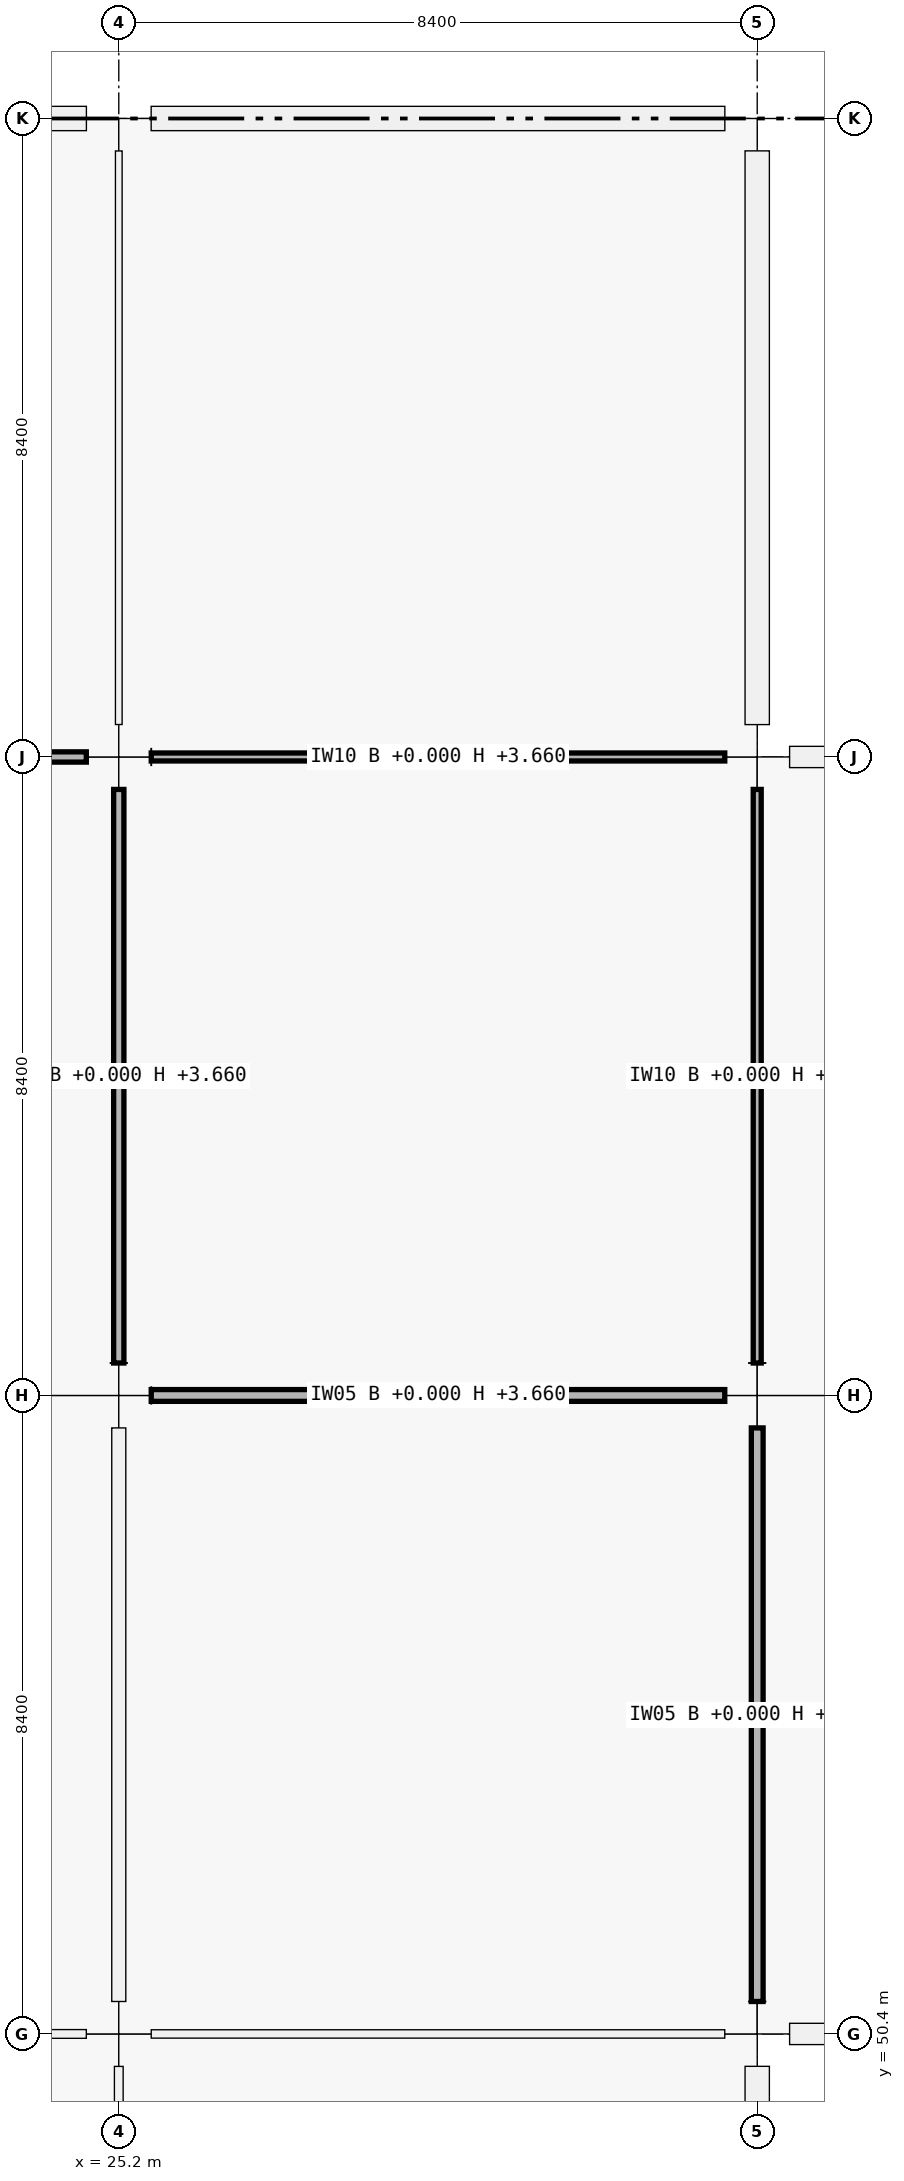
"""IFC4 building model, lengths in metres.
Left out: names, types, materials, properties, quantities, classifications, styles, units other than length and angle.
Written with IfcOpenShell. Run it as: python <this file> out.ifc"""

import sys

from ifc_helpers import new_model, si_unit, direction, frame, frame_2d, origin, origin_2d, place, context, subcontext, project, spatial, rectangle, extrude, element, fill, save


model = new_model("IFC4")
c1 = context("Model", 3, precision=1e-05, world=origin(), true_north=direction((0.0, 1.0)))
c2 = subcontext(c1, "Body", "Model", "MODEL_VIEW")
j1 = project(units=[si_unit("LENGTHUNIT", "METRE"), si_unit("PLANEANGLEUNIT", "RADIAN")], contexts=[c1])
p1 = place(None, origin())
s1 = spatial("IfcSite", under=j1, at=p1, CompositionType="ELEMENT")
p2 = place(p1, origin())
s2 = spatial("IfcBuilding", under=s1, at=p2, CompositionType="ELEMENT")
p3 = place(p2, origin())
s3 = spatial("IfcBuildingStorey", under=s2, at=p3, CompositionType="ELEMENT", Elevation=0.0)
for number, where, z_axis, x_axis in (
    (1, (25.2, 50.4, 0.0), (0.0, 0.0, 1.0), (1.0, 0.0, 0.0)),
    (2, (25.2, 58.8, 0.0), (0.0, 0.0, 1.0), (1.0, 0.0, 0.0)),
    (3, (25.2, 67.2, 0.0), (0.0, 0.0, 1.0), (1.0, 0.0, 0.0)),
    (4, (25.2, 75.6, 0.0), (0.0, 0.0, 1.0), (1.0, 0.0, 0.0)),
    (5, (33.6, 50.4, 0.0), (0.0, 0.0, 1.0), (1.0, 0.0, 0.0)),
    (6, (33.6, 58.8, 0.0), (0.0, 0.0, 1.0), (1.0, 0.0, 0.0)),
    (7, (33.6, 67.2, 0.0), (0.0, 0.0, 1.0), (1.0, 0.0, 0.0)),
    (8, (33.6, 75.6, 0.0), (0.0, 0.0, 1.0), (1.0, 0.0, 0.0)),
):
    element("IfcColumn", number, at=place(p3, frame(where, z_axis=z_axis, x_axis=x_axis)), inside=s3, PredefinedType="COLUMN", context=c2, shape_type="SweptSolid", body=[
        extrude(rectangle(XDim=0.85, YDim=0.85, at=origin_2d()), origin(), (0.0, 0.0, 1.0), 5.76),
    ])
p4 = place(p3, frame((17.226, 75.6, 0.0), z_axis=(0.0, 0.0, 1.0), x_axis=(1.0, 0.0, 0.0)))
e9 = element("IfcWall", 9, at=p4, inside=s3, PredefinedType="SOLIDWALL", context=c2, shape_type="SweptSolid", body=[
    extrude(rectangle(XDim=7.548, YDim=0.32, at=frame_2d((3.774, 0.0))), origin(), (0.0, 0.0, 1.0), 4.7),
])
p5 = place(p4, frame((2.474, 0.0, 0.9)))
e10 = element("IfcOpeningElement", 10, at=p5, cuts=e9, PredefinedType="OPENING", context=c2, shape_type="SweptSolid", body=[
    extrude(rectangle(XDim=2.6, YDim=2.1, at=frame_2d((1.3, 1.05))), frame((0.0, 0.16, 0.0), z_axis=(0.0, -1.0, 0.0), x_axis=(1.0, 0.0, 0.0)), (0.0, 0.0, 1.0), 0.32),
])
p6 = place(p3, frame((33.6, 49.974, 0.0), z_axis=(0.0, 0.0, 1.0), x_axis=(0.0, -1.0, 0.0)))
e11 = element("IfcWall", 11, at=p6, inside=s3, PredefinedType="SOLIDWALL", context=c2, shape_type="SweptSolid", body=[
    extrude(rectangle(XDim=7.548, YDim=0.32, at=frame_2d((3.774, 0.0))), origin(), (0.0, 0.0, 1.0), 4.7),
])
p7 = place(p6, frame((2.674, 0.0, 0.9)))
e12 = element("IfcOpeningElement", 12, at=p7, cuts=e11, PredefinedType="OPENING", context=c2, shape_type="SweptSolid", body=[
    extrude(rectangle(XDim=2.2, YDim=1.75, at=frame_2d((1.1, 0.875))), frame((0.0, 0.16, 0.0), z_axis=(0.0, -1.0, 0.0), x_axis=(1.0, 0.0, 0.0)), (0.0, 0.0, 1.0), 0.32),
])
p8 = place(p3, frame((25.626, 75.6, 0.0), z_axis=(0.0, 0.0, 1.0), x_axis=(1.0, 0.0, 0.0)))
e13 = element("IfcWall", 13, at=p8, inside=s3, PredefinedType="SOLIDWALL", context=c2, shape_type="SweptSolid", body=[
    extrude(rectangle(XDim=7.548, YDim=0.32, at=frame_2d((3.774, 0.0))), origin(), (0.0, 0.0, 1.0), 4.7),
])
p9 = place(p8, frame((2.374, 0.0, 0.9)))
e14 = element("IfcOpeningElement", 14, at=p9, cuts=e13, PredefinedType="OPENING", context=c2, shape_type="SweptSolid", body=[
    extrude(rectangle(XDim=2.8, YDim=1.75, at=frame_2d((1.4, 0.875))), frame((0.0, 0.16, 0.0), z_axis=(0.0, -1.0, 0.0), x_axis=(1.0, 0.0, 0.0)), (0.0, 0.0, 1.0), 0.32),
])
p10 = place(p3, frame((33.6, 75.174, 0.0), z_axis=(0.0, 0.0, 1.0), x_axis=(0.0, -1.0, 0.0)))
e15 = element("IfcWall", 15, at=p10, inside=s3, PredefinedType="SOLIDWALL", context=c2, shape_type="SweptSolid", body=[
    extrude(rectangle(XDim=7.548, YDim=0.32, at=frame_2d((3.774, 0.0))), origin(), (0.0, 0.0, 1.0), 4.7),
])
p11 = place(p10, frame((2.824, 0.0, 0.9)))
e16 = element("IfcOpeningElement", 16, at=p11, cuts=e15, PredefinedType="OPENING", context=c2, shape_type="SweptSolid", body=[
    extrude(rectangle(XDim=1.9, YDim=1.75, at=frame_2d((0.95, 0.875))), frame((0.0, 0.16, 0.0), z_axis=(0.0, -1.0, 0.0), x_axis=(1.0, 0.0, 0.0)), (0.0, 0.0, 1.0), 0.32),
])
p12 = place(p3, frame((41.599, 50.4, 0.0), z_axis=(0.0, 0.0, 1.0), x_axis=(-1.0, 0.0, 0.0)))
e17 = element("IfcWall", 17, at=p12, inside=s3, PredefinedType="SOLIDWALL", context=c2, shape_type="SweptSolid", body=[
    extrude(rectangle(XDim=7.573, YDim=0.28, at=frame_2d((3.787, 0.0))), origin(), (0.0, 0.0, 1.0), 4.7),
])
p13 = place(p3, frame((34.026, 67.2, 0.0), z_axis=(0.0, 0.0, 1.0), x_axis=(1.0, 0.0, 0.0)))
e18 = element("IfcWall", 18, at=p13, inside=s3, PredefinedType="SOLIDWALL", context=c2, shape_type="SweptSolid", body=[
    extrude(rectangle(XDim=7.548, YDim=0.28, at=frame_2d((3.774, 0.0))), origin(), (0.0, 0.0, 1.0), 4.7),
])
p14 = place(p13, frame((3.074, 0.0, 0.9)))
e19 = element("IfcOpeningElement", 19, at=p14, cuts=e18, PredefinedType="OPENING", context=c2, shape_type="SweptSolid", body=[
    extrude(rectangle(XDim=1.4, YDim=1.75, at=frame_2d((0.7, 0.875))), frame((0.0, 0.14, 0.0), z_axis=(0.0, -1.0, 0.0), x_axis=(1.0, 0.0, 0.0)), (0.0, 0.0, 1.0), 0.28),
])
p15 = place(p3, frame((17.227, 50.4, 0.0), z_axis=(0.0, 0.0, 1.0), x_axis=(1.0, 0.0, 0.0)))
e20 = element("IfcWall", 20, at=p15, inside=s3, PredefinedType="PARTITIONING", context=c2, shape_type="SweptSolid", body=[
    extrude(rectangle(XDim=7.546, YDim=0.115, at=frame_2d((3.773, 0.0))), origin(), (0.0, 0.0, 1.0), 3.66),
])
p16 = place(p15, frame((0.578, 0.0, 0.0)))
e21 = element("IfcOpeningElement", 21, at=p16, cuts=e20, PredefinedType="OPENING", context=c2, shape_type="SweptSolid", body=[
    extrude(rectangle(XDim=0.92, YDim=2.1, at=frame_2d((0.46, 1.05))), frame((0.0, 0.058, 0.0), z_axis=(0.0, -1.0, 0.0), x_axis=(1.0, 0.0, 0.0)), (0.0, 0.0, 1.0), 0.115),
])
p17 = place(p15, frame((4.468, 0.0, 0.0)))
e22 = element("IfcOpeningElement", 22, at=p17, cuts=e20, PredefinedType="OPENING", context=c2, shape_type="SweptSolid", body=[
    extrude(rectangle(XDim=0.98, YDim=2.08, at=frame_2d((0.49, 1.04))), frame((0.0, 0.058, 0.0), z_axis=(0.0, -1.0, 0.0), x_axis=(1.0, 0.0, 0.0)), (0.0, 0.0, 1.0), 0.115),
])
p18 = place(p3, frame((17.227, 67.2, 0.0), z_axis=(0.0, 0.0, 1.0), x_axis=(1.0, 0.0, 0.0)))
e23 = element("IfcWall", 23, at=p18, inside=s3, PredefinedType="PARTITIONING", context=c2, shape_type="SweptSolid", body=[
    extrude(rectangle(XDim=7.546, YDim=0.135, at=frame_2d((3.773, 0.0))), origin(), (0.0, 0.0, 1.0), 3.66),
])
p19 = place(p18, frame((3.283, 0.0, 0.0)))
e24 = element("IfcOpeningElement", 24, at=p19, cuts=e23, PredefinedType="OPENING", context=c2, shape_type="SweptSolid", body=[
    extrude(rectangle(XDim=0.98, YDim=2.18, at=frame_2d((0.49, 1.09))), frame((0.0, 0.067, 0.0), z_axis=(0.0, -1.0, 0.0), x_axis=(1.0, 0.0, 0.0)), (0.0, 0.0, 1.0), 0.135),
])
p20 = place(p3, frame((25.627, 50.4, 0.0), z_axis=(0.0, 0.0, 1.0), x_axis=(1.0, 0.0, 0.0)))
e25 = element("IfcWall", 25, at=p20, inside=s3, PredefinedType="MOVABLE", context=c2, shape_type="SweptSolid", body=[
    extrude(rectangle(XDim=7.546, YDim=0.11, at=frame_2d((3.773, 0.0))), origin(), (0.0, 0.0, 1.0), 3.66),
])
p21 = place(p20, frame((3.233, 0.0, 0.0)))
e26 = element("IfcOpeningElement", 26, at=p21, cuts=e25, PredefinedType="OPENING", context=c2, shape_type="SweptSolid", body=[
    extrude(rectangle(XDim=1.08, YDim=2.25, at=frame_2d((0.54, 1.125))), frame((0.0, 0.055, 0.0), z_axis=(0.0, -1.0, 0.0), x_axis=(1.0, 0.0, 0.0)), (0.0, 0.0, 1.0), 0.11),
])
p22 = place(p3, frame((25.627, 58.8, 0.0), z_axis=(0.0, 0.0, 1.0), x_axis=(1.0, 0.0, 0.0)))
e27 = element("IfcWall", 27, at=p22, inside=s3, PredefinedType="PARTITIONING", context=c2, shape_type="SweptSolid", body=[
    extrude(rectangle(XDim=7.546, YDim=0.155, at=frame_2d((3.773, 0.0))), origin(), (0.0, 0.0, 1.0), 3.66),
])
p23 = place(p22, frame((3.243, 0.0, 0.0)))
e28 = element("IfcOpeningElement", 28, at=p23, cuts=e27, PredefinedType="OPENING", context=c2, shape_type="SweptSolid", body=[
    extrude(rectangle(XDim=1.06, YDim=2.25, at=frame_2d((0.53, 1.125))), frame((0.0, 0.078, 0.0), z_axis=(0.0, -1.0, 0.0), x_axis=(1.0, 0.0, 0.0)), (0.0, 0.0, 1.0), 0.155),
])
p24 = place(p3, frame((25.627, 67.2, 0.0), z_axis=(0.0, 0.0, 1.0), x_axis=(1.0, 0.0, 0.0)))
e29 = element("IfcWall", 29, at=p24, inside=s3, PredefinedType="PARTITIONING", context=c2, shape_type="SweptSolid", body=[
    extrude(rectangle(XDim=7.546, YDim=0.105, at=frame_2d((3.773, 0.0))), origin(), (0.0, 0.0, 1.0), 3.66),
])
p25 = place(p24, frame((3.248, 0.0, 0.0)))
e30 = element("IfcOpeningElement", 30, at=p25, cuts=e29, PredefinedType="OPENING", context=c2, shape_type="SweptSolid", body=[
    extrude(rectangle(XDim=1.05, YDim=2.12, at=frame_2d((0.525, 1.06))), frame((0.0, 0.052, 0.0), z_axis=(0.0, -1.0, 0.0), x_axis=(1.0, 0.0, 0.0)), (0.0, 0.0, 1.0), 0.105),
])
p26 = place(p3, frame((25.2, 42.427, 0.0), z_axis=(0.0, 0.0, 1.0), x_axis=(0.0, 1.0, 0.0)))
e31 = element("IfcWall", 31, at=p26, inside=s3, PredefinedType="PARTITIONING", context=c2, shape_type="SweptSolid", body=[
    extrude(rectangle(XDim=7.546, YDim=0.115, at=frame_2d((3.773, 0.0))), origin(), (0.0, 0.0, 1.0), 3.66),
])
p27 = place(p3, frame((25.2, 50.827, 0.0), z_axis=(0.0, 0.0, 1.0), x_axis=(0.0, 1.0, 0.0)))
e32 = element("IfcWall", 32, at=p27, inside=s3, PredefinedType="PARTITIONING", context=c2, shape_type="SweptSolid", body=[
    extrude(rectangle(XDim=7.546, YDim=0.185, at=frame_2d((3.773, 0.0))), origin(), (0.0, 0.0, 1.0), 3.66),
])
p28 = place(p27, frame((3.303, 0.0, 0.0)))
e33 = element("IfcOpeningElement", 33, at=p28, cuts=e32, PredefinedType="OPENING", context=c2, shape_type="SweptSolid", body=[
    extrude(rectangle(XDim=0.94, YDim=2.15, at=frame_2d((0.47, 1.075))), frame((0.0, 0.093, 0.0), z_axis=(0.0, -1.0, 0.0), x_axis=(1.0, 0.0, 0.0)), (0.0, 0.0, 1.0), 0.185),
])
p29 = place(p3, frame((25.2, 59.227, 0.0), z_axis=(0.0, 0.0, 1.0), x_axis=(0.0, 1.0, 0.0)))
e34 = element("IfcWall", 34, at=p29, inside=s3, PredefinedType="PARTITIONING", context=c2, shape_type="SweptSolid", body=[
    extrude(rectangle(XDim=7.546, YDim=0.135, at=frame_2d((3.773, 0.0))), origin(), (0.0, 0.0, 1.0), 3.66),
])
p30 = place(p29, frame((3.313, 0.0, 0.0)))
e35 = element("IfcOpeningElement", 35, at=p30, cuts=e34, PredefinedType="OPENING", context=c2, shape_type="SweptSolid", body=[
    extrude(rectangle(XDim=0.92, YDim=2.15, at=frame_2d((0.46, 1.075))), frame((0.0, 0.067, 0.0), z_axis=(0.0, -1.0, 0.0), x_axis=(1.0, 0.0, 0.0)), (0.0, 0.0, 1.0), 0.135),
])
p31 = place(p3, frame((25.2, 67.627, 0.0), z_axis=(0.0, 0.0, 1.0), x_axis=(0.0, 1.0, 0.0)))
e36 = element("IfcWall", 36, at=p31, inside=s3, PredefinedType="PARTITIONING", context=c2, shape_type="SweptSolid", body=[
    extrude(rectangle(XDim=7.546, YDim=0.088, at=frame_2d((3.773, 0.0))), origin(), (0.0, 0.0, 1.0), 3.66),
])
p32 = place(p31, frame((3.288, 0.0, 0.0)))
e37 = element("IfcOpeningElement", 37, at=p32, cuts=e36, PredefinedType="OPENING", context=c2, shape_type="SweptSolid", body=[
    extrude(rectangle(XDim=0.97, YDim=2.12, at=frame_2d((0.485, 1.06))), frame((0.0, 0.044, 0.0), z_axis=(0.0, -1.0, 0.0), x_axis=(1.0, 0.0, 0.0)), (0.0, 0.0, 1.0), 0.088),
])
p33 = place(p3, frame((33.6, 50.827, 0.0), z_axis=(0.0, 0.0, 1.0), x_axis=(0.0, 1.0, 0.0)))
e38 = element("IfcWall", 38, at=p33, inside=s3, PredefinedType="PARTITIONING", context=c2, shape_type="SweptSolid", body=[
    extrude(rectangle(XDim=7.546, YDim=0.155, at=frame_2d((3.773, 0.0))), origin(), (0.0, 0.0, 1.0), 3.66),
])
p34 = place(p33, frame((3.048, 0.0, 0.0)))
e39 = element("IfcOpeningElement", 39, at=p34, cuts=e38, PredefinedType="OPENING", context=c2, shape_type="SweptSolid", body=[
    extrude(rectangle(XDim=1.45, YDim=2.2, at=frame_2d((0.725, 1.1))), frame((0.0, 0.078, 0.0), z_axis=(0.0, -1.0, 0.0), x_axis=(1.0, 0.0, 0.0)), (0.0, 0.0, 1.0), 0.155),
])
p35 = place(p3, frame((33.6, 59.227, 0.0), z_axis=(0.0, 0.0, 1.0), x_axis=(0.0, 1.0, 0.0)))
e40 = element("IfcWall", 40, at=p35, inside=s3, PredefinedType="PARTITIONING", context=c2, shape_type="SweptSolid", body=[
    extrude(rectangle(XDim=7.546, YDim=0.105, at=frame_2d((3.773, 0.0))), origin(), (0.0, 0.0, 1.0), 3.66),
])
p36 = place(p35, frame((3.073, 0.0, 0.0)))
e41 = element("IfcOpeningElement", 41, at=p36, cuts=e40, PredefinedType="OPENING", context=c2, shape_type="SweptSolid", body=[
    extrude(rectangle(XDim=1.4, YDim=2.25, at=frame_2d((0.7, 1.125))), frame((0.0, 0.052, 0.0), z_axis=(0.0, -1.0, 0.0), x_axis=(1.0, 0.0, 0.0)), (0.0, 0.0, 1.0), 0.105),
])
p37 = place(p9, origin())
e42 = element("IfcWindow", 42, at=p37, inside=s3, PartitioningType="SINGLE_PANEL", PredefinedType="WINDOW", context=c2, shape_type="SweptSolid", body=[
    extrude(rectangle(XDim=2.8, YDim=1.75, at=frame_2d((1.4, 0.875))), frame((0.0, 0.03, 0.0), z_axis=(0.0, -1.0, 0.0), x_axis=(1.0, 0.0, 0.0)), (0.0, 0.0, 1.0), 0.06),
])
fill(e14, e42)
p38 = place(p11, origin())
e43 = element("IfcWindow", 43, at=p38, inside=s3, PartitioningType="SINGLE_PANEL", PredefinedType="WINDOW", context=c2, shape_type="SweptSolid", body=[
    extrude(rectangle(XDim=1.9, YDim=1.75, at=frame_2d((0.95, 0.875))), frame((0.0, 0.03, 0.0), z_axis=(0.0, -1.0, 0.0), x_axis=(1.0, 0.0, 0.0)), (0.0, 0.0, 1.0), 0.06),
])
fill(e16, e43)
p39 = place(p28, origin())
e44 = element("IfcDoor", 44, at=p39, inside=s3, OperationType="SINGLE_SWING_LEFT", PredefinedType="DOOR", context=c2, shape_type="SweptSolid", body=[
    extrude(rectangle(XDim=0.94, YDim=2.15, at=frame_2d((0.47, 1.075))), frame((0.0, 0.025, 0.0), z_axis=(0.0, -1.0, 0.0), x_axis=(1.0, 0.0, 0.0)), (0.0, 0.0, 1.0), 0.05),
])
fill(e33, e44)
p40 = place(p30, origin())
e45 = element("IfcDoor", 45, at=p40, inside=s3, OperationType="SINGLE_SWING_RIGHT", PredefinedType="DOOR", context=c2, shape_type="SweptSolid", body=[
    extrude(rectangle(XDim=0.92, YDim=2.15, at=frame_2d((0.46, 1.075))), frame((0.0, 0.025, 0.0), z_axis=(0.0, -1.0, 0.0), x_axis=(1.0, 0.0, 0.0)), (0.0, 0.0, 1.0), 0.05),
])
fill(e35, e45)
p41 = place(p34, origin())
e46 = element("IfcDoor", 46, at=p41, inside=s3, OperationType="DOUBLE_DOOR_SINGLE_SWING", PredefinedType="DOOR", context=c2, shape_type="SweptSolid", body=[
    extrude(rectangle(XDim=1.45, YDim=2.2, at=frame_2d((0.725, 1.1))), frame((0.0, 0.025, 0.0), z_axis=(0.0, -1.0, 0.0), x_axis=(1.0, 0.0, 0.0)), (0.0, 0.0, 1.0), 0.05),
])
fill(e39, e46)
p42 = place(p36, origin())
e47 = element("IfcDoor", 47, at=p42, inside=s3, OperationType="DOUBLE_DOOR_SINGLE_SWING", PredefinedType="DOOR", context=c2, shape_type="SweptSolid", body=[
    extrude(rectangle(XDim=1.4, YDim=2.25, at=frame_2d((0.7, 1.125))), frame((0.0, 0.025, 0.0), z_axis=(0.0, -1.0, 0.0), x_axis=(1.0, 0.0, 0.0)), (0.0, 0.0, 1.0), 0.05),
])
fill(e41, e47)
p43 = place(p25, origin())
e48 = element("IfcDoor", 48, at=p43, inside=s3, OperationType="SINGLE_SWING_LEFT", PredefinedType="DOOR", context=c2, shape_type="SweptSolid", body=[
    extrude(rectangle(XDim=1.05, YDim=2.12, at=frame_2d((0.525, 1.06))), frame((0.0, 0.025, 0.0), z_axis=(0.0, -1.0, 0.0), x_axis=(1.0, 0.0, 0.0)), (0.0, 0.0, 1.0), 0.05),
])
fill(e30, e48)
p44 = place(p21, origin())
e49 = element("IfcDoor", 49, at=p44, inside=s3, OperationType="SINGLE_SWING_LEFT", PredefinedType="DOOR", context=c2, shape_type="SweptSolid", body=[
    extrude(rectangle(XDim=1.08, YDim=2.25, at=frame_2d((0.54, 1.125))), frame((0.0, 0.025, 0.0), z_axis=(0.0, -1.0, 0.0), x_axis=(1.0, 0.0, 0.0)), (0.0, 0.0, 1.0), 0.05),
])
fill(e26, e49)
p45 = place(p23, origin())
e50 = element("IfcDoor", 50, at=p45, inside=s3, OperationType="SINGLE_SWING_RIGHT", PredefinedType="DOOR", context=c2, shape_type="SweptSolid", body=[
    extrude(rectangle(XDim=1.06, YDim=2.25, at=frame_2d((0.53, 1.125))), frame((0.0, 0.025, 0.0), z_axis=(0.0, -1.0, 0.0), x_axis=(1.0, 0.0, 0.0)), (0.0, 0.0, 1.0), 0.05),
])
fill(e28, e50)
p46 = place(p32, origin())
e51 = element("IfcDoor", 51, at=p46, inside=s3, OperationType="SINGLE_SWING_RIGHT", PredefinedType="DOOR", context=c2, shape_type="SweptSolid", body=[
    extrude(rectangle(XDim=0.97, YDim=2.12, at=frame_2d((0.485, 1.06))), frame((0.0, 0.025, 0.0), z_axis=(0.0, -1.0, 0.0), x_axis=(1.0, 0.0, 0.0)), (0.0, 0.0, 1.0), 0.05),
])
fill(e37, e51)
save(model, sys.argv[1])
